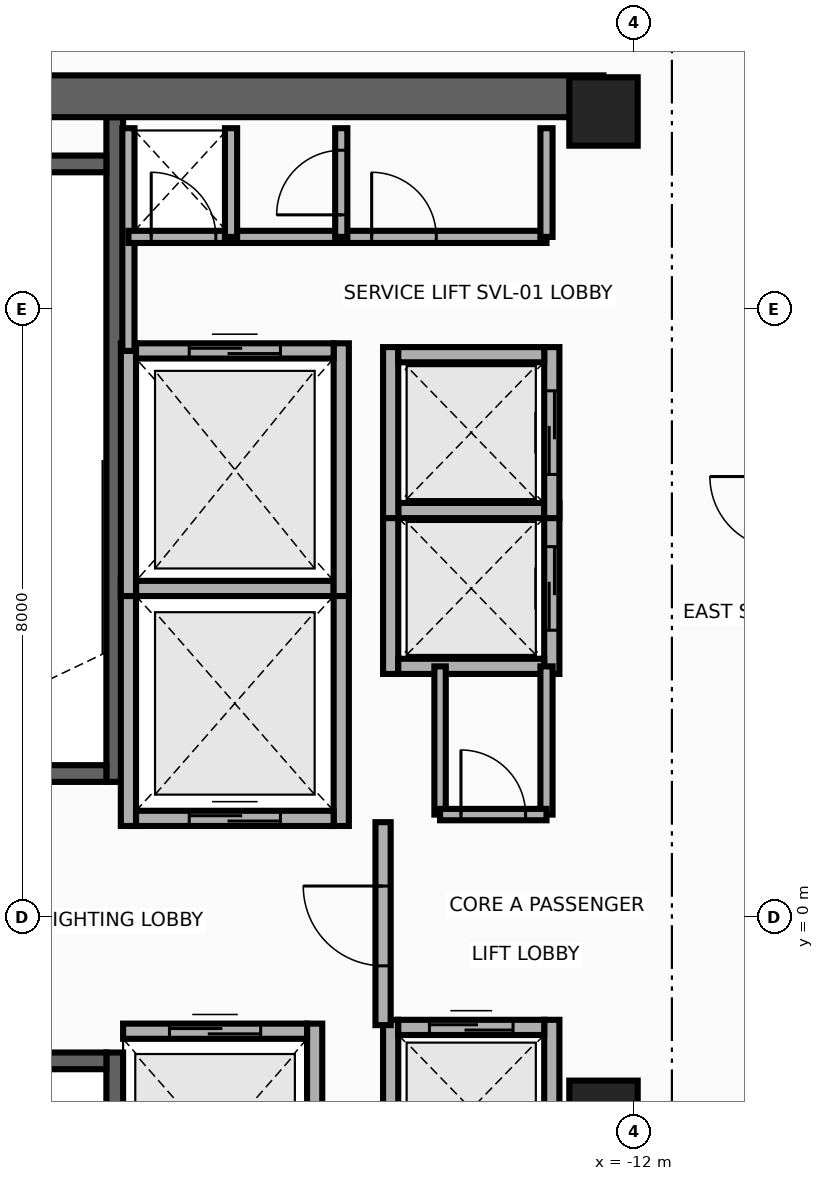
"""IFC4 building model, lengths in metres.
Left out: names, types, materials, properties, quantities, classifications, styles, units other than length and angle.
Written with IfcOpenShell. Run it as: python <this file> out.ifc"""

import sys

from ifc_helpers import new_model, si_unit, direction, frame, frame_2d, origin, origin_2d, place, context, subcontext, project, spatial, rectangle, extrude, source, transform, mapped, element, fill, save


model = new_model("IFC4")
c1 = context("Model", 3, precision=1e-05, world=origin(), true_north=direction((0.0, 1.0)))
c2 = subcontext(c1, "Body", "Model", "MODEL_VIEW")
j1 = project(units=[si_unit("LENGTHUNIT", "METRE"), si_unit("PLANEANGLEUNIT", "RADIAN")], contexts=[c1])
p1 = place(None, origin())
s1 = spatial("IfcSite", under=j1, at=p1, CompositionType="ELEMENT")
p2 = place(p1, origin())
s2 = spatial("IfcBuilding", under=s1, at=p2, CompositionType="ELEMENT")
p3 = place(p2, frame((0.0, 0.0, 226.5)))
s3 = spatial("IfcBuildingStorey", under=s2, at=p3, CompositionType="ELEMENT", Elevation=226.5)
p4 = place(p3, frame((-18.83, 1.78, 0.0), z_axis=(0.0, 0.0, 1.0), x_axis=(0.0, 1.0, 0.0)))
e1 = element("IfcWall", 1, at=p4, inside=s3, PredefinedType="SHEAR", context=c2, shape_type="SweptSolid", body=[
    extrude(rectangle(XDim=8.745, YDim=0.22, at=frame_2d((4.373, 0.0))), origin(), (0.0, 0.0, 1.0), 3.26),
])
p5 = place(p3, frame((-22.05, 1.89, 0.0), z_axis=(0.0, 0.0, 1.0), x_axis=(1.0, 0.0, 0.0)))
e2 = element("IfcWall", 2, at=p5, inside=s3, PredefinedType="SHEAR", context=c2, shape_type="SweptSolid", body=[
    extrude(rectangle(XDim=3.11, YDim=0.22, at=frame_2d((1.555, 0.0))), origin(), (0.0, 0.0, 1.0), 3.26),
])
p6 = place(p5, frame((1.0, 0.0, 0.0)))
e3 = element("IfcOpeningElement", 3, at=p6, cuts=e2, PredefinedType="OPENING", context=c2, shape_type="SweptSolid", body=[
    extrude(rectangle(XDim=1.1, YDim=2.15, at=frame_2d((0.55, 1.075))), frame((0.0, 0.125, 0.0), z_axis=(0.0, -1.0, 0.0), x_axis=(1.0, 0.0, 0.0)), (0.0, 0.0, 1.0), 0.25),
])
p7 = place(p3, frame((-22.05, 9.91, 0.0), z_axis=(0.0, 0.0, 1.0), x_axis=(1.0, 0.0, 0.0)))
e4 = element("IfcWall", 4, at=p7, inside=s3, PredefinedType="SHEAR", context=c2, shape_type="SweptSolid", body=[
    extrude(rectangle(XDim=3.11, YDim=0.22, at=frame_2d((1.555, 0.0))), origin(), (0.0, 0.0, 1.0), 3.26),
])
p8 = place(p3, frame((-18.83, -10.525, 0.0), z_axis=(0.0, 0.0, 1.0), x_axis=(0.0, 1.0, 0.0)))
e5 = element("IfcWall", 5, at=p8, inside=s3, PredefinedType="SHEAR", context=c2, shape_type="SweptSolid", body=[
    extrude(rectangle(XDim=8.745, YDim=0.22, at=frame_2d((4.373, 0.0))), origin(), (0.0, 0.0, 1.0), 3.26),
])
p9 = place(p3, frame((-22.05, -1.89, 0.0), z_axis=(0.0, 0.0, 1.0), x_axis=(1.0, 0.0, 0.0)))
e6 = element("IfcWall", 6, at=p9, inside=s3, PredefinedType="SHEAR", context=c2, shape_type="SweptSolid", body=[
    extrude(rectangle(XDim=3.11, YDim=0.22, at=frame_2d((1.555, 0.0))), origin(), (0.0, 0.0, 1.0), 3.26),
])
p10 = place(p9, frame((1.0, 0.0, 0.0)))
e7 = element("IfcOpeningElement", 7, at=p10, cuts=e6, PredefinedType="OPENING", context=c2, shape_type="SweptSolid", body=[
    extrude(rectangle(XDim=1.1, YDim=2.15, at=frame_2d((0.55, 1.075))), frame((0.0, 0.125, 0.0), z_axis=(0.0, -1.0, 0.0), x_axis=(1.0, 0.0, 0.0)), (0.0, 0.0, 1.0), 0.25),
])
p11 = place(p3, frame((-22.65, 10.8, 0.0), z_axis=(0.0, 0.0, 1.0), x_axis=(1.0, 0.0, 0.0)))
e8 = element("IfcWall", 8, at=p11, inside=s3, PredefinedType="SHEAR", context=c2, shape_type="SweptSolid", body=[
    extrude(rectangle(XDim=10.25, YDim=0.55, at=frame_2d((5.125, 0.0))), origin(), (0.0, 0.0, 1.0), 3.26),
])
m1 = source(origin(), c2, "Body", "SweptSolid", [
    extrude(rectangle(XDim=0.9, YDim=0.9, at=origin_2d()), origin(), (0.0, 0.0, 1.0), 3.5),
])
for number, where, z_axis, x_axis in (
    (9, (-12.4, -2.6, 0.0), (0.0, 0.0, 1.0), (1.0, 0.0, 0.0)),
    (10, (-12.4, 10.6, 0.0), (0.0, 0.0, 1.0), (1.0, 0.0, 0.0)),
):
    element("IfcColumn", number, at=place(p3, frame(where, z_axis=z_axis, x_axis=x_axis)), inside=s3, PredefinedType="COLUMN", context=c2, shape_type="MappedRepresentation", body=[
        mapped(m1, transform((0.0, 0.0, 0.0), x_axis=(1.0, 0.0, 0.0), y_axis=(0.0, 1.0, 0.0), z_axis=(0.0, 0.0, 1.0), scale=1.0)),
    ])
for number, where, z_axis, x_axis in (
    (11, (-18.65, 1.2, 0.0), (0.0, 0.0, 1.0), (0.0, 1.0, 0.0)),
    (12, (-15.85, 1.2, 0.0), (0.0, 0.0, 1.0), (0.0, 1.0, 0.0)),
):
    element("IfcWall", number, at=place(p3, frame(where, z_axis=z_axis, x_axis=x_axis)), inside=s3, PredefinedType="MOVABLE", context=c2, shape_type="SweptSolid", body=[
        extrude(rectangle(XDim=3.225, YDim=0.2, at=frame_2d((1.613, 0.0))), origin(), (0.0, 0.0, 1.0), 3.26),
    ])
p12 = place(p3, frame((-18.55, 1.3, 0.0), z_axis=(0.0, 0.0, 1.0), x_axis=(1.0, 0.0, 0.0)))
e13 = element("IfcWall", 13, at=p12, inside=s3, PredefinedType="MOVABLE", context=c2, shape_type="SweptSolid", body=[
    extrude(rectangle(XDim=2.6, YDim=0.2, at=frame_2d((1.3, 0.0))), origin(), (0.0, 0.0, 1.0), 3.26),
])
p13 = place(p12, frame((0.7, 0.0, 0.0)))
e14 = element("IfcOpeningElement", 14, at=p13, cuts=e13, PredefinedType="OPENING", context=c2, shape_type="SweptSolid", body=[
    extrude(rectangle(XDim=1.2, YDim=2.1, at=frame_2d((0.6, 1.05))), frame((0.0, 0.115, 0.0), z_axis=(0.0, -1.0, 0.0), x_axis=(1.0, 0.0, 0.0)), (0.0, 0.0, 1.0), 0.23),
])
p14 = place(p3, frame((-18.55, 4.325, 0.0), z_axis=(0.0, 0.0, 1.0), x_axis=(1.0, 0.0, 0.0)))
e15 = element("IfcWall", 15, at=p14, inside=s3, PredefinedType="MOVABLE", context=c2, shape_type="SweptSolid", body=[
    extrude(rectangle(XDim=2.6, YDim=0.2, at=frame_2d((1.3, 0.0))), origin(), (0.0, 0.0, 1.0), 3.26),
])
p15 = place(p3, frame((-16.2, -4.6, 0.0), z_axis=(0.0, 0.0, 1.0), x_axis=(0.0, 1.0, 0.0)))
e16 = element("IfcWall", 16, at=p15, inside=s3, PredefinedType="MOVABLE", context=c2, shape_type="SweptSolid", body=[
    extrude(rectangle(XDim=3.2, YDim=0.2, at=frame_2d((1.6, 0.0))), origin(), (0.0, 0.0, 1.0), 3.26),
])
p16 = place(p3, frame((-18.72, -1.5, 0.0), z_axis=(0.0, 0.0, 1.0), x_axis=(1.0, 0.0, 0.0)))
e17 = element("IfcWall", 17, at=p16, inside=s3, PredefinedType="MOVABLE", context=c2, shape_type="SweptSolid", body=[
    extrude(rectangle(XDim=2.42, YDim=0.2, at=frame_2d((1.21, 0.0))), origin(), (0.0, 0.0, 1.0), 3.26),
])
p17 = place(p16, frame((0.61, 0.0, 0.0)))
e18 = element("IfcOpeningElement", 18, at=p17, cuts=e17, PredefinedType="OPENING", context=c2, shape_type="SweptSolid", body=[
    extrude(rectangle(XDim=1.2, YDim=2.1, at=frame_2d((0.6, 1.05))), frame((0.0, 0.115, 0.0), z_axis=(0.0, -1.0, 0.0), x_axis=(1.0, 0.0, 0.0)), (0.0, 0.0, 1.0), 0.23),
])
for number, where, z_axis, x_axis in (
    (19, (-18.65, 4.225, 0.0), (0.0, 0.0, 1.0), (0.0, 1.0, 0.0)),
    (20, (-15.85, 4.225, 0.0), (0.0, 0.0, 1.0), (0.0, 1.0, 0.0)),
):
    element("IfcWall", number, at=place(p3, frame(where, z_axis=z_axis, x_axis=x_axis)), inside=s3, PredefinedType="MOVABLE", context=c2, shape_type="SweptSolid", body=[
        extrude(rectangle(XDim=3.325, YDim=0.2, at=frame_2d((1.663, 0.0))), origin(), (0.0, 0.0, 1.0), 3.26),
    ])
p18 = place(p3, frame((-18.55, 7.45, 0.0), z_axis=(0.0, 0.0, 1.0), x_axis=(1.0, 0.0, 0.0)))
e21 = element("IfcWall", 21, at=p18, inside=s3, PredefinedType="MOVABLE", context=c2, shape_type="SweptSolid", body=[
    extrude(rectangle(XDim=2.6, YDim=0.2, at=frame_2d((1.3, 0.0))), origin(), (0.0, 0.0, 1.0), 3.26),
])
p19 = place(p18, frame((0.7, 0.0, 0.0)))
e22 = element("IfcOpeningElement", 22, at=p19, cuts=e21, PredefinedType="OPENING", context=c2, shape_type="SweptSolid", body=[
    extrude(rectangle(XDim=1.2, YDim=2.1, at=frame_2d((0.6, 1.05))), frame((0.0, 0.115, 0.0), z_axis=(0.0, -1.0, 0.0), x_axis=(1.0, 0.0, 0.0)), (0.0, 0.0, 1.0), 0.23),
])
p20 = place(p3, frame((-15.2, 3.2, 0.0), z_axis=(0.0, 0.0, 1.0), x_axis=(0.0, 1.0, 0.0)))
e23 = element("IfcWall", 23, at=p20, inside=s3, PredefinedType="MOVABLE", context=c2, shape_type="SweptSolid", body=[
    extrude(rectangle(XDim=2.25, YDim=0.2, at=frame_2d((1.125, 0.0))), origin(), (0.0, 0.0, 1.0), 3.26),
])
p21 = place(p3, frame((-13.08, 3.2, 0.0), z_axis=(0.0, 0.0, 1.0), x_axis=(0.0, 1.0, 0.0)))
e24 = element("IfcWall", 24, at=p21, inside=s3, PredefinedType="MOVABLE", context=c2, shape_type="SweptSolid", body=[
    extrude(rectangle(XDim=2.25, YDim=0.2, at=frame_2d((1.125, 0.0))), origin(), (0.0, 0.0, 1.0), 3.26),
])
p22 = place(p21, frame((0.575, 0.0, 0.0)))
e25 = element("IfcOpeningElement", 25, at=p22, cuts=e24, PredefinedType="OPENING", context=c2, shape_type="SweptSolid", body=[
    extrude(rectangle(XDim=1.1, YDim=2.1, at=frame_2d((0.55, 1.05))), frame((0.0, 0.115, 0.0), z_axis=(0.0, -1.0, 0.0), x_axis=(1.0, 0.0, 0.0)), (0.0, 0.0, 1.0), 0.23),
])
for number, where, z_axis, x_axis in (
    (26, (-15.1, 3.3, 0.0), (0.0, 0.0, 1.0), (1.0, 0.0, 0.0)),
    (27, (-15.1, 5.35, 0.0), (0.0, 0.0, 1.0), (1.0, 0.0, 0.0)),
):
    element("IfcWall", number, at=place(p3, frame(where, z_axis=z_axis, x_axis=x_axis)), inside=s3, PredefinedType="MOVABLE", context=c2, shape_type="SweptSolid", body=[
        extrude(rectangle(XDim=1.92, YDim=0.2, at=frame_2d((0.96, 0.0))), origin(), (0.0, 0.0, 1.0), 3.26),
    ])
p23 = place(p3, frame((-15.2, 5.25, 0.0), z_axis=(0.0, 0.0, 1.0), x_axis=(0.0, 1.0, 0.0)))
e28 = element("IfcWall", 28, at=p23, inside=s3, PredefinedType="MOVABLE", context=c2, shape_type="SweptSolid", body=[
    extrude(rectangle(XDim=2.25, YDim=0.2, at=frame_2d((1.125, 0.0))), origin(), (0.0, 0.0, 1.0), 3.26),
])
p24 = place(p3, frame((-13.08, 5.25, 0.0), z_axis=(0.0, 0.0, 1.0), x_axis=(0.0, 1.0, 0.0)))
e29 = element("IfcWall", 29, at=p24, inside=s3, PredefinedType="MOVABLE", context=c2, shape_type="SweptSolid", body=[
    extrude(rectangle(XDim=2.25, YDim=0.2, at=frame_2d((1.125, 0.0))), origin(), (0.0, 0.0, 1.0), 3.26),
])
p25 = place(p24, frame((0.575, 0.0, 0.0)))
e30 = element("IfcOpeningElement", 30, at=p25, cuts=e29, PredefinedType="OPENING", context=c2, shape_type="SweptSolid", body=[
    extrude(rectangle(XDim=1.1, YDim=2.1, at=frame_2d((0.55, 1.05))), frame((0.0, 0.115, 0.0), z_axis=(0.0, -1.0, 0.0), x_axis=(1.0, 0.0, 0.0)), (0.0, 0.0, 1.0), 0.23),
])
p26 = place(p3, frame((-15.1, 7.4, 0.0), z_axis=(0.0, 0.0, 1.0), x_axis=(1.0, 0.0, 0.0)))
e31 = element("IfcWall", 31, at=p26, inside=s3, PredefinedType="MOVABLE", context=c2, shape_type="SweptSolid", body=[
    extrude(rectangle(XDim=1.92, YDim=0.2, at=frame_2d((0.96, 0.0))), origin(), (0.0, 0.0, 1.0), 3.26),
])
for number, where, z_axis, x_axis in (
    (32, (-15.2, -3.7, 0.0), (0.0, 0.0, 1.0), (0.0, 1.0, 0.0)),
    (33, (-13.08, -3.7, 0.0), (0.0, 0.0, 1.0), (0.0, 1.0, 0.0)),
):
    element("IfcWall", number, at=place(p3, frame(where, z_axis=z_axis, x_axis=x_axis)), inside=s3, PredefinedType="MOVABLE", context=c2, shape_type="SweptSolid", body=[
        extrude(rectangle(XDim=2.35, YDim=0.2, at=frame_2d((1.175, 0.0))), origin(), (0.0, 0.0, 1.0), 3.26),
    ])
p27 = place(p3, frame((-15.1, -1.45, 0.0), z_axis=(0.0, 0.0, 1.0), x_axis=(1.0, 0.0, 0.0)))
e34 = element("IfcWall", 34, at=p27, inside=s3, PredefinedType="MOVABLE", context=c2, shape_type="SweptSolid", body=[
    extrude(rectangle(XDim=1.92, YDim=0.2, at=frame_2d((0.96, 0.0))), origin(), (0.0, 0.0, 1.0), 3.26),
])
p28 = place(p27, frame((0.41, 0.0, 0.0)))
e35 = element("IfcOpeningElement", 35, at=p28, cuts=e34, PredefinedType="OPENING", context=c2, shape_type="SweptSolid", body=[
    extrude(rectangle(XDim=1.1, YDim=2.1, at=frame_2d((0.55, 1.05))), frame((0.0, 0.115, 0.0), z_axis=(0.0, -1.0, 0.0), x_axis=(1.0, 0.0, 0.0)), (0.0, 0.0, 1.0), 0.23),
])
p29 = place(p3, frame((-15.3, -1.42, 0.0), z_axis=(0.0, 0.0, 1.0), x_axis=(0.0, 1.0, 0.0)))
e36 = element("IfcWall", 36, at=p29, inside=s3, PredefinedType="PARTITIONING", context=c2, shape_type="SweptSolid", body=[
    extrude(rectangle(XDim=2.67, YDim=0.2, at=frame_2d((1.335, 0.0))), origin(), (0.0, 0.0, 1.0), 3.26),
])
p30 = place(p29, frame((0.78, 0.0, 0.0)))
e37 = element("IfcOpeningElement", 37, at=p30, cuts=e36, PredefinedType="OPENING", context=c2, shape_type="SweptSolid", body=[
    extrude(rectangle(XDim=1.05, YDim=2.15, at=frame_2d((0.525, 1.075))), frame((0.0, 0.115, 0.0), z_axis=(0.0, -1.0, 0.0), x_axis=(1.0, 0.0, 0.0)), (0.0, 0.0, 1.0), 0.23),
])
p31 = place(p3, frame((-18.65, 7.45, 0.0), z_axis=(0.0, 0.0, 1.0), x_axis=(0.0, 1.0, 0.0)))
e38 = element("IfcWall", 38, at=p31, inside=s3, PredefinedType="PARTITIONING", context=c2, shape_type="SweptSolid", body=[
    extrude(rectangle(XDim=2.93, YDim=0.16, at=frame_2d((1.465, 0.0))), origin(), (0.0, 0.0, 1.0), 3.26),
])
p32 = place(p3, frame((-18.65, 8.95, 0.0), z_axis=(0.0, 0.0, 1.0), x_axis=(1.0, 0.0, 0.0)))
e39 = element("IfcWall", 39, at=p32, inside=s3, PredefinedType="PARTITIONING", context=c2, shape_type="SweptSolid", body=[
    extrude(rectangle(XDim=5.5, YDim=0.16, at=frame_2d((2.75, 0.0))), origin(), (0.0, 0.0, 1.0), 3.26),
])
p33 = place(p32, frame((0.3, 0.0, 0.0)))
e40 = element("IfcOpeningElement", 40, at=p33, cuts=e39, PredefinedType="OPENING", context=c2, shape_type="SweptSolid", body=[
    extrude(rectangle(XDim=0.85, YDim=2.05, at=frame_2d((0.425, 1.025))), frame((0.0, 0.095, 0.0), z_axis=(0.0, -1.0, 0.0), x_axis=(1.0, 0.0, 0.0)), (0.0, 0.0, 1.0), 0.19),
])
p34 = place(p32, frame((3.2, 0.0, 0.0)))
e41 = element("IfcOpeningElement", 41, at=p34, cuts=e39, PredefinedType="OPENING", context=c2, shape_type="SweptSolid", body=[
    extrude(rectangle(XDim=0.85, YDim=2.05, at=frame_2d((0.425, 1.025))), frame((0.0, 0.095, 0.0), z_axis=(0.0, -1.0, 0.0), x_axis=(1.0, 0.0, 0.0)), (0.0, 0.0, 1.0), 0.19),
])
for number, where, z_axis, x_axis in (
    (42, (-13.15, 8.95, 0.0), (0.0, 0.0, 1.0), (0.0, 1.0, 0.0)),
    (43, (-17.3, 8.95, 0.0), (0.0, 0.0, 1.0), (0.0, 1.0, 0.0)),
):
    element("IfcWall", number, at=place(p3, frame(where, z_axis=z_axis, x_axis=x_axis)), inside=s3, PredefinedType="PARTITIONING", context=c2, shape_type="SweptSolid", body=[
        extrude(rectangle(XDim=1.43, YDim=0.16, at=frame_2d((0.715, 0.0))), origin(), (0.0, 0.0, 1.0), 3.26),
    ])
p35 = place(p3, frame((-15.85, 8.95, 0.0), z_axis=(0.0, 0.0, 1.0), x_axis=(0.0, 1.0, 0.0)))
e44 = element("IfcWall", 44, at=p35, inside=s3, PredefinedType="PARTITIONING", context=c2, shape_type="SweptSolid", body=[
    extrude(rectangle(XDim=1.43, YDim=0.16, at=frame_2d((0.715, 0.0))), origin(), (0.0, 0.0, 1.0), 3.26),
])
p36 = place(p35, frame((0.29, 0.0, 0.0)))
e45 = element("IfcOpeningElement", 45, at=p36, cuts=e44, PredefinedType="OPENING", context=c2, shape_type="SweptSolid", body=[
    extrude(rectangle(XDim=0.85, YDim=2.05, at=frame_2d((0.425, 1.025))), frame((0.0, 0.095, 0.0), z_axis=(0.0, -1.0, 0.0), x_axis=(1.0, 0.0, 0.0)), (0.0, 0.0, 1.0), 0.19),
])
p37 = place(p3, frame((-13.15, 1.35, 0.0), z_axis=(0.0, 0.0, 1.0), x_axis=(0.0, 1.0, 0.0)))
e46 = element("IfcWall", 46, at=p37, inside=s3, PredefinedType="PARTITIONING", context=c2, shape_type="SweptSolid", body=[
    extrude(rectangle(XDim=1.95, YDim=0.16, at=frame_2d((0.975, 0.0))), origin(), (0.0, 0.0, 1.0), 3.26),
])
p38 = place(p3, frame((-14.55, 1.35, 0.0), z_axis=(0.0, 0.0, 1.0), x_axis=(0.0, 1.0, 0.0)))
e47 = element("IfcWall", 47, at=p38, inside=s3, PredefinedType="PARTITIONING", context=c2, shape_type="SweptSolid", body=[
    extrude(rectangle(XDim=1.95, YDim=0.15, at=frame_2d((0.975, 0.0))), origin(), (0.0, 0.0, 1.0), 3.26),
])
p39 = place(p3, frame((-14.55, 1.35, 0.0), z_axis=(0.0, 0.0, 1.0), x_axis=(1.0, 0.0, 0.0)))
e48 = element("IfcWall", 48, at=p39, inside=s3, PredefinedType="PARTITIONING", context=c2, shape_type="SweptSolid", body=[
    extrude(rectangle(XDim=1.4, YDim=0.15, at=frame_2d((0.7, 0.0))), origin(), (0.0, 0.0, 1.0), 3.26),
])
p40 = place(p39, frame((0.275, 0.0, 0.0)))
e49 = element("IfcOpeningElement", 49, at=p40, cuts=e48, PredefinedType="OPENING", context=c2, shape_type="SweptSolid", body=[
    extrude(rectangle(XDim=0.85, YDim=2.05, at=frame_2d((0.425, 1.025))), frame((0.0, 0.09, 0.0), z_axis=(0.0, -1.0, 0.0), x_axis=(1.0, 0.0, 0.0)), (0.0, 0.0, 1.0), 0.18),
])
p41 = place(p13, origin())
e50 = element("IfcDoor", 50, at=p41, inside=s3, OperationType="DOUBLE_DOOR_SLIDING", PredefinedType="DOOR", context=c2, shape_type="SweptSolid", body=[
    extrude(rectangle(XDim=1.2, YDim=2.1, at=frame_2d((0.6, 1.05))), frame((0.0, 0.025, 0.0), z_axis=(0.0, -1.0, 0.0), x_axis=(1.0, 0.0, 0.0)), (0.0, 0.0, 1.0), 0.05),
])
fill(e14, e50)
p42 = place(p17, origin())
e51 = element("IfcDoor", 51, at=p42, inside=s3, OperationType="DOUBLE_DOOR_SLIDING", PredefinedType="DOOR", context=c2, shape_type="SweptSolid", body=[
    extrude(rectangle(XDim=1.2, YDim=2.1, at=frame_2d((0.6, 1.05))), frame((0.0, 0.025, 0.0), z_axis=(0.0, -1.0, 0.0), x_axis=(1.0, 0.0, 0.0)), (0.0, 0.0, 1.0), 0.05),
])
fill(e18, e51)
p43 = place(p19, origin())
e52 = element("IfcDoor", 52, at=p43, inside=s3, OperationType="DOUBLE_DOOR_SLIDING", PredefinedType="DOOR", context=c2, shape_type="SweptSolid", body=[
    extrude(rectangle(XDim=1.2, YDim=2.1, at=frame_2d((0.6, 1.05))), frame((0.0, 0.025, 0.0), z_axis=(0.0, -1.0, 0.0), x_axis=(1.0, 0.0, 0.0)), (0.0, 0.0, 1.0), 0.05),
])
fill(e22, e52)
p44 = place(p22, origin())
e53 = element("IfcDoor", 53, at=p44, inside=s3, OperationType="DOUBLE_DOOR_SLIDING", PredefinedType="DOOR", context=c2, shape_type="SweptSolid", body=[
    extrude(rectangle(XDim=1.1, YDim=2.1, at=frame_2d((0.55, 1.05))), frame((0.0, 0.025, 0.0), z_axis=(0.0, -1.0, 0.0), x_axis=(1.0, 0.0, 0.0)), (0.0, 0.0, 1.0), 0.05),
])
fill(e25, e53)
p45 = place(p25, origin())
e54 = element("IfcDoor", 54, at=p45, inside=s3, OperationType="DOUBLE_DOOR_SLIDING", PredefinedType="DOOR", context=c2, shape_type="SweptSolid", body=[
    extrude(rectangle(XDim=1.1, YDim=2.1, at=frame_2d((0.55, 1.05))), frame((0.0, 0.025, 0.0), z_axis=(0.0, -1.0, 0.0), x_axis=(1.0, 0.0, 0.0)), (0.0, 0.0, 1.0), 0.05),
])
fill(e30, e54)
p46 = place(p28, origin())
e55 = element("IfcDoor", 55, at=p46, inside=s3, OperationType="DOUBLE_DOOR_SLIDING", PredefinedType="DOOR", context=c2, shape_type="SweptSolid", body=[
    extrude(rectangle(XDim=1.1, YDim=2.1, at=frame_2d((0.55, 1.05))), frame((0.0, 0.025, 0.0), z_axis=(0.0, -1.0, 0.0), x_axis=(1.0, 0.0, 0.0)), (0.0, 0.0, 1.0), 0.05),
])
fill(e35, e55)
p47 = place(p30, origin())
e56 = element("IfcDoor", 56, at=p47, inside=s3, OperationType="SINGLE_SWING_RIGHT", PredefinedType="DOOR", context=c2, shape_type="SweptSolid", body=[
    extrude(rectangle(XDim=1.05, YDim=2.15, at=frame_2d((0.525, 1.075))), frame((0.0, 0.025, 0.0), z_axis=(0.0, -1.0, 0.0), x_axis=(1.0, 0.0, 0.0)), (0.0, 0.0, 1.0), 0.05),
])
fill(e37, e56)
p48 = place(p33, origin())
e57 = element("IfcDoor", 57, at=p48, inside=s3, OperationType="SINGLE_SWING_LEFT", PredefinedType="DOOR", context=c2, shape_type="SweptSolid", body=[
    extrude(rectangle(XDim=0.85, YDim=2.05, at=frame_2d((0.425, 1.025))), frame((0.0, 0.025, 0.0), z_axis=(0.0, -1.0, 0.0), x_axis=(1.0, 0.0, 0.0)), (0.0, 0.0, 1.0), 0.05),
])
fill(e40, e57)
p49 = place(p34, origin())
e58 = element("IfcDoor", 58, at=p49, inside=s3, OperationType="SINGLE_SWING_RIGHT", PredefinedType="DOOR", context=c2, shape_type="SweptSolid", body=[
    extrude(rectangle(XDim=0.85, YDim=2.05, at=frame_2d((0.425, 1.025))), frame((0.0, 0.025, 0.0), z_axis=(0.0, -1.0, 0.0), x_axis=(1.0, 0.0, 0.0)), (0.0, 0.0, 1.0), 0.05),
])
fill(e41, e58)
p50 = place(p36, origin())
e59 = element("IfcDoor", 59, at=p50, inside=s3, OperationType="SINGLE_SWING_LEFT", PredefinedType="DOOR", context=c2, shape_type="SweptSolid", body=[
    extrude(rectangle(XDim=0.85, YDim=2.05, at=frame_2d((0.425, 1.025))), frame((0.0, 0.025, 0.0), z_axis=(0.0, -1.0, 0.0), x_axis=(1.0, 0.0, 0.0)), (0.0, 0.0, 1.0), 0.05),
])
fill(e45, e59)
p51 = place(p40, origin())
e60 = element("IfcDoor", 60, at=p51, inside=s3, OperationType="SINGLE_SWING_RIGHT", PredefinedType="DOOR", context=c2, shape_type="SweptSolid", body=[
    extrude(rectangle(XDim=0.85, YDim=2.05, at=frame_2d((0.425, 1.025))), frame((0.0, 0.025, 0.0), z_axis=(0.0, -1.0, 0.0), x_axis=(1.0, 0.0, 0.0)), (0.0, 0.0, 1.0), 0.05),
])
fill(e49, e60)
save(model, sys.argv[1])
